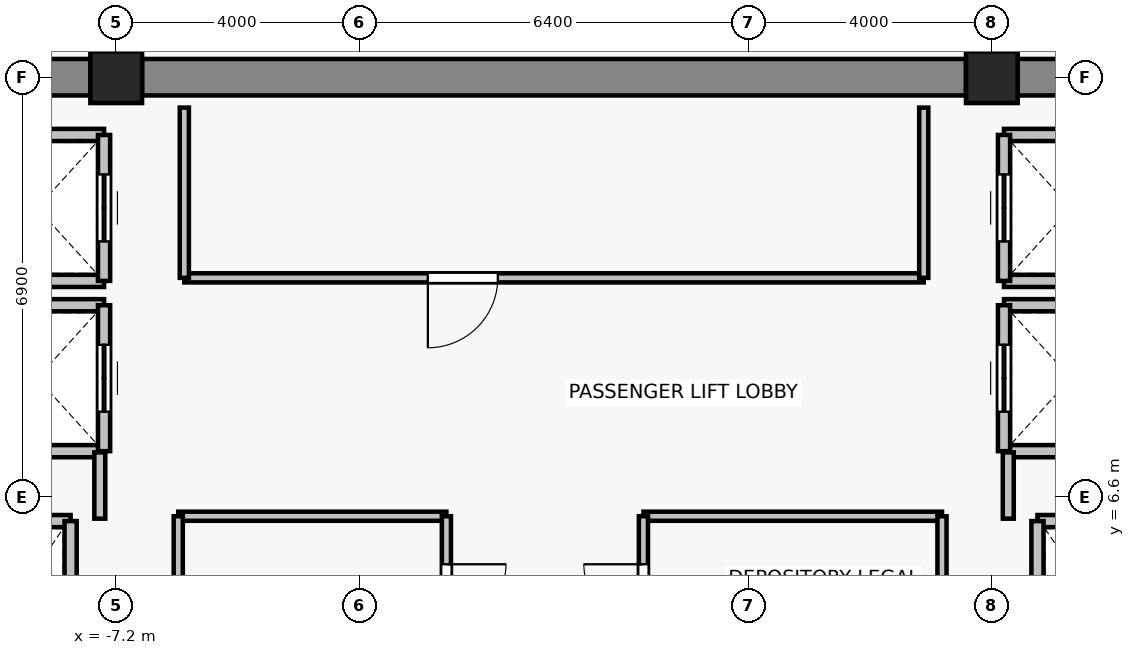
"""IFC4 building model, lengths in metres.
Left out: names, types, materials, properties, quantities, classifications, styles, units other than length and angle.
Written with IfcOpenShell. Run it as: python <this file> out.ifc"""

import sys

from ifc_helpers import new_model, si_unit, direction, frame, frame_2d, origin, origin_2d, place, context, subcontext, project, spatial, rectangle, extrude, source, transform, mapped, element, fill, save


model = new_model("IFC4")
c1 = context("Model", 3, precision=1e-05, world=origin(), true_north=direction((0.0, 1.0)))
c2 = subcontext(c1, "Body", "Model", "MODEL_VIEW")
j1 = project(units=[si_unit("LENGTHUNIT", "METRE"), si_unit("PLANEANGLEUNIT", "RADIAN")], contexts=[c1])
p1 = place(None, origin())
s1 = spatial("IfcSite", under=j1, at=p1, CompositionType="ELEMENT")
p2 = place(p1, origin())
s2 = spatial("IfcBuilding", under=s1, at=p2, CompositionType="ELEMENT")
p3 = place(p2, frame((0.0, 0.0, 255.1)))
s3 = spatial("IfcBuildingStorey", under=s2, at=p3, CompositionType="ELEMENT", Elevation=255.1)
for number, where, z_axis, x_axis in (
    (1, (-7.2, 13.5, 0.0), (0.0, 0.0, 1.0), (1.0, 0.0, 0.0)),
    (2, (7.2, 13.5, 0.0), (0.0, 0.0, 1.0), (1.0, 0.0, 0.0)),
):
    element("IfcColumn", number, at=place(p3, frame(where, z_axis=z_axis, x_axis=x_axis)), inside=s3, PredefinedType="COLUMN", context=c2, shape_type="SweptSolid", body=[
        extrude(rectangle(XDim=0.85, YDim=0.85, at=origin_2d()), origin(), (0.0, 0.0, 1.0), 3.3),
    ])
p4 = place(p3, frame((-13.975, 13.5, 0.0), z_axis=(0.0, 0.0, 1.0), x_axis=(1.0, 0.0, 0.0)))
e3 = element("IfcWall", 3, at=p4, inside=s3, PredefinedType="SHEAR", context=c2, shape_type="SweptSolid", body=[
    extrude(rectangle(XDim=6.35, YDim=0.6, at=frame_2d((3.175, 0.0))), origin(), (0.0, 0.0, 1.0), 3.075),
])
p5 = place(p3, frame((-6.775, 13.5, 0.0), z_axis=(0.0, 0.0, 1.0), x_axis=(1.0, 0.0, 0.0)))
e4 = element("IfcWall", 4, at=p5, inside=s3, PredefinedType="SHEAR", context=c2, shape_type="SweptSolid", body=[
    extrude(rectangle(XDim=13.55, YDim=0.6, at=frame_2d((6.775, 0.0))), origin(), (0.0, 0.0, 1.0), 3.075),
])
p6 = place(p3, frame((7.625, 13.5, 0.0), z_axis=(0.0, 0.0, 1.0), x_axis=(1.0, 0.0, 0.0)))
e5 = element("IfcWall", 5, at=p6, inside=s3, PredefinedType="SHEAR", context=c2, shape_type="SweptSolid", body=[
    extrude(rectangle(XDim=6.35, YDim=0.6, at=frame_2d((3.175, 0.0))), origin(), (0.0, 0.0, 1.0), 3.075),
])
p7 = place(p3, frame((-9.95, 6.2, 0.0), z_axis=(0.0, 0.0, 1.0), x_axis=(1.0, 0.0, 0.0)))
e6 = element("IfcWall", 6, at=p7, inside=s3, PredefinedType="SOLIDWALL", context=c2, shape_type="SweptSolid", body=[
    extrude(rectangle(XDim=2.0, YDim=0.2, at=frame_2d((1.0, 0.0))), origin(), (0.0, 0.0, 1.0), 3.075),
])
p8 = place(p3, frame((-7.95, 6.2, 0.0), z_axis=(0.0, 0.0, 1.0), x_axis=(0.0, -1.0, 0.0)))
e7 = element("IfcWall", 7, at=p8, inside=s3, PredefinedType="SOLIDWALL", context=c2, shape_type="SweptSolid", body=[
    extrude(rectangle(XDim=2.8, YDim=0.2, at=frame_2d((1.4, 0.0))), origin(), (0.0, 0.0, 1.0), 3.075),
])
p9 = place(p3, frame((7.95, 6.2, 0.0), z_axis=(0.0, 0.0, 1.0), x_axis=(1.0, 0.0, 0.0)))
e8 = element("IfcWall", 8, at=p9, inside=s3, PredefinedType="SOLIDWALL", context=c2, shape_type="SweptSolid", body=[
    extrude(rectangle(XDim=2.0, YDim=0.2, at=frame_2d((1.0, 0.0))), origin(), (0.0, 0.0, 1.0), 3.075),
])
p10 = place(p3, frame((7.95, 3.4, 0.0), z_axis=(0.0, 0.0, 1.0), x_axis=(0.0, 1.0, 0.0)))
e9 = element("IfcWall", 9, at=p10, inside=s3, PredefinedType="SOLIDWALL", context=c2, shape_type="SweptSolid", body=[
    extrude(rectangle(XDim=2.8, YDim=0.2, at=frame_2d((1.4, 0.0))), origin(), (0.0, 0.0, 1.0), 3.075),
])
for number, where, z_axis, x_axis in (
    (10, (-7.4, 7.35, 0.0), (0.0, 0.0, 1.0), (-1.0, 0.0, 0.0)),
    (11, (-9.6, 9.75, 0.0), (0.0, 0.0, 1.0), (1.0, 0.0, 0.0)),
):
    element("IfcWall", number, at=place(p3, frame(where, z_axis=z_axis, x_axis=x_axis)), inside=s3, PredefinedType="SOLIDWALL", context=c2, shape_type="SweptSolid", body=[
        extrude(rectangle(XDim=2.2, YDim=0.2, at=frame_2d((1.1, 0.0))), origin(), (0.0, 0.0, 1.0), 2.615),
    ])
p11 = place(p3, frame((-7.4, 9.75, 0.0), z_axis=(0.0, 0.0, 1.0), x_axis=(0.0, -1.0, 0.0)))
e12 = element("IfcWall", 12, at=p11, inside=s3, PredefinedType="SOLIDWALL", context=c2, shape_type="SweptSolid", body=[
    extrude(rectangle(XDim=2.4, YDim=0.2, at=frame_2d((1.2, 0.0))), origin(), (0.0, 0.0, 1.0), 2.615),
])
p12 = place(p11, frame((0.65, 0.0, 0.0)))
e13 = element("IfcOpeningElement", 13, at=p12, cuts=e12, PredefinedType="OPENING", context=c2, shape_type="SweptSolid", body=[
    extrude(rectangle(XDim=1.1, YDim=2.2, at=frame_2d((0.55, 1.1))), frame((0.0, 0.11, 0.0), z_axis=(0.0, -1.0, 0.0), x_axis=(1.0, 0.0, 0.0)), (0.0, 0.0, 1.0), 0.22),
])
for number, where, z_axis, x_axis in (
    (14, (-7.4, 10.15, 0.0), (0.0, 0.0, 1.0), (-1.0, 0.0, 0.0)),
    (15, (-9.6, 12.55, 0.0), (0.0, 0.0, 1.0), (1.0, 0.0, 0.0)),
):
    element("IfcWall", number, at=place(p3, frame(where, z_axis=z_axis, x_axis=x_axis)), inside=s3, PredefinedType="SOLIDWALL", context=c2, shape_type="SweptSolid", body=[
        extrude(rectangle(XDim=2.2, YDim=0.2, at=frame_2d((1.1, 0.0))), origin(), (0.0, 0.0, 1.0), 2.615),
    ])
p13 = place(p3, frame((-7.4, 12.55, 0.0), z_axis=(0.0, 0.0, 1.0), x_axis=(0.0, -1.0, 0.0)))
e16 = element("IfcWall", 16, at=p13, inside=s3, PredefinedType="SOLIDWALL", context=c2, shape_type="SweptSolid", body=[
    extrude(rectangle(XDim=2.4, YDim=0.2, at=frame_2d((1.2, 0.0))), origin(), (0.0, 0.0, 1.0), 2.615),
])
p14 = place(p13, frame((0.65, 0.0, 0.0)))
e17 = element("IfcOpeningElement", 17, at=p14, cuts=e16, PredefinedType="OPENING", context=c2, shape_type="SweptSolid", body=[
    extrude(rectangle(XDim=1.1, YDim=2.2, at=frame_2d((0.55, 1.1))), frame((0.0, 0.11, 0.0), z_axis=(0.0, -1.0, 0.0), x_axis=(1.0, 0.0, 0.0)), (0.0, 0.0, 1.0), 0.22),
])
for number, where, z_axis, x_axis in (
    (18, (9.6, 7.35, 0.0), (0.0, 0.0, 1.0), (-1.0, 0.0, 0.0)),
    (19, (7.4, 9.75, 0.0), (0.0, 0.0, 1.0), (1.0, 0.0, 0.0)),
):
    element("IfcWall", number, at=place(p3, frame(where, z_axis=z_axis, x_axis=x_axis)), inside=s3, PredefinedType="SOLIDWALL", context=c2, shape_type="SweptSolid", body=[
        extrude(rectangle(XDim=2.2, YDim=0.2, at=frame_2d((1.1, 0.0))), origin(), (0.0, 0.0, 1.0), 2.615),
    ])
p15 = place(p3, frame((7.4, 7.35, 0.0), z_axis=(0.0, 0.0, 1.0), x_axis=(0.0, 1.0, 0.0)))
e20 = element("IfcWall", 20, at=p15, inside=s3, PredefinedType="SOLIDWALL", context=c2, shape_type="SweptSolid", body=[
    extrude(rectangle(XDim=2.4, YDim=0.2, at=frame_2d((1.2, 0.0))), origin(), (0.0, 0.0, 1.0), 2.615),
])
p16 = place(p15, frame((0.65, 0.0, 0.0)))
e21 = element("IfcOpeningElement", 21, at=p16, cuts=e20, PredefinedType="OPENING", context=c2, shape_type="SweptSolid", body=[
    extrude(rectangle(XDim=1.1, YDim=2.2, at=frame_2d((0.55, 1.1))), frame((0.0, 0.11, 0.0), z_axis=(0.0, -1.0, 0.0), x_axis=(1.0, 0.0, 0.0)), (0.0, 0.0, 1.0), 0.22),
])
for number, where, z_axis, x_axis in (
    (22, (9.6, 10.15, 0.0), (0.0, 0.0, 1.0), (-1.0, 0.0, 0.0)),
    (23, (7.4, 12.55, 0.0), (0.0, 0.0, 1.0), (1.0, 0.0, 0.0)),
):
    element("IfcWall", number, at=place(p3, frame(where, z_axis=z_axis, x_axis=x_axis)), inside=s3, PredefinedType="SOLIDWALL", context=c2, shape_type="SweptSolid", body=[
        extrude(rectangle(XDim=2.2, YDim=0.2, at=frame_2d((1.1, 0.0))), origin(), (0.0, 0.0, 1.0), 2.615),
    ])
p17 = place(p3, frame((7.4, 10.15, 0.0), z_axis=(0.0, 0.0, 1.0), x_axis=(0.0, 1.0, 0.0)))
e24 = element("IfcWall", 24, at=p17, inside=s3, PredefinedType="SOLIDWALL", context=c2, shape_type="SweptSolid", body=[
    extrude(rectangle(XDim=2.4, YDim=0.2, at=frame_2d((1.2, 0.0))), origin(), (0.0, 0.0, 1.0), 2.615),
])
p18 = place(p17, frame((0.65, 0.0, 0.0)))
e25 = element("IfcOpeningElement", 25, at=p18, cuts=e24, PredefinedType="OPENING", context=c2, shape_type="SweptSolid", body=[
    extrude(rectangle(XDim=1.1, YDim=2.2, at=frame_2d((0.55, 1.1))), frame((0.0, 0.11, 0.0), z_axis=(0.0, -1.0, 0.0), x_axis=(1.0, 0.0, 0.0)), (0.0, 0.0, 1.0), 0.22),
])
for number, where, z_axis, x_axis in (
    (26, (-7.47, 7.33, 0.0), (0.0, 0.0, 1.0), (0.0, -1.0, 0.0)),
    (27, (7.47, 6.24, 0.0), (0.0, 0.0, 1.0), (0.0, 1.0, 0.0)),
):
    element("IfcWall", number, at=place(p3, frame(where, z_axis=z_axis, x_axis=x_axis)), inside=s3, PredefinedType="PARTITIONING", context=c2, shape_type="SweptSolid", body=[
        extrude(rectangle(XDim=1.09, YDim=0.18, at=frame_2d((0.545, 0.0))), origin(), (0.0, 0.0, 1.0), 2.615),
    ])
p19 = place(p3, frame((6.08, 10.2, 0.0), z_axis=(0.0, 0.0, 1.0), x_axis=(-1.0, 0.0, 0.0)))
e28 = element("IfcWall", 28, at=p19, inside=s3, PredefinedType="PARTITIONING", context=c2, shape_type="SweptSolid", body=[
    extrude(rectangle(XDim=12.16, YDim=0.15, at=frame_2d((6.08, 0.0))), origin(), (0.0, 0.0, 1.0), 3.075),
])
p20 = place(p19, frame((7.005, 0.0, 0.0)))
e29 = element("IfcOpeningElement", 29, at=p20, cuts=e28, PredefinedType="OPENING", context=c2, shape_type="SweptSolid", body=[
    extrude(rectangle(XDim=1.15, YDim=2.15, at=frame_2d((0.575, 1.075))), frame((0.0, 0.085, 0.0), z_axis=(0.0, -1.0, 0.0), x_axis=(1.0, 0.0, 0.0)), (0.0, 0.0, 1.0), 0.17),
])
for number, where, z_axis, x_axis in (
    (30, (-6.08, 10.2, 0.0), (0.0, 0.0, 1.0), (0.0, 1.0, 0.0)),
    (31, (6.08, 13.0, 0.0), (0.0, 0.0, 1.0), (0.0, -1.0, 0.0)),
):
    element("IfcWall", number, at=place(p3, frame(where, z_axis=z_axis, x_axis=x_axis)), inside=s3, PredefinedType="PARTITIONING", context=c2, shape_type="SweptSolid", body=[
        extrude(rectangle(XDim=2.8, YDim=0.15, at=frame_2d((1.4, 0.0))), origin(), (0.0, 0.0, 1.0), 3.075),
    ])
p21 = place(p3, frame((-6.18, 6.28, 0.0), z_axis=(0.0, 0.0, 1.0), x_axis=(1.0, 0.0, 0.0)))
e32 = element("IfcWall", 32, at=p21, inside=s3, PredefinedType="PARTITIONING", context=c2, shape_type="SweptSolid", body=[
    extrude(rectangle(XDim=4.41, YDim=0.15, at=frame_2d((2.205, 0.0))), origin(), (0.0, 0.0, 1.0), 3.075),
])
p22 = place(p3, frame((-6.18, 3.76, 0.0), z_axis=(0.0, 0.0, 1.0), x_axis=(0.0, 1.0, 0.0)))
e33 = element("IfcWall", 33, at=p22, inside=s3, PredefinedType="PARTITIONING", context=c2, shape_type="SweptSolid", body=[
    extrude(rectangle(XDim=2.52, YDim=0.15, at=frame_2d((1.26, 0.0))), origin(), (0.0, 0.0, 1.0), 3.075),
])
p23 = place(p3, frame((-1.77, 6.28, 0.0), z_axis=(0.0, 0.0, 1.0), x_axis=(0.0, -1.0, 0.0)))
e34 = element("IfcWall", 34, at=p23, inside=s3, PredefinedType="PARTITIONING", context=c2, shape_type="SweptSolid", body=[
    extrude(rectangle(XDim=2.52, YDim=0.15, at=frame_2d((1.26, 0.0))), origin(), (0.0, 0.0, 1.0), 3.075),
])
p24 = place(p23, frame((0.79, 0.0, 0.0)))
e35 = element("IfcOpeningElement", 35, at=p24, cuts=e34, PredefinedType="OPENING", context=c2, shape_type="SweptSolid", body=[
    extrude(rectangle(XDim=0.98, YDim=2.15, at=frame_2d((0.49, 1.075))), frame((0.0, 0.085, 0.0), z_axis=(0.0, -1.0, 0.0), x_axis=(1.0, 0.0, 0.0)), (0.0, 0.0, 1.0), 0.17),
])
p25 = place(p3, frame((1.47, 6.28, 0.0), z_axis=(0.0, 0.0, 1.0), x_axis=(1.0, 0.0, 0.0)))
e36 = element("IfcWall", 36, at=p25, inside=s3, PredefinedType="PARTITIONING", context=c2, shape_type="SweptSolid", body=[
    extrude(rectangle(XDim=4.91, YDim=0.15, at=frame_2d((2.455, 0.0))), origin(), (0.0, 0.0, 1.0), 3.075),
])
p26 = place(p3, frame((1.47, 3.76, 0.0), z_axis=(0.0, 0.0, 1.0), x_axis=(0.0, 1.0, 0.0)))
e37 = element("IfcWall", 37, at=p26, inside=s3, PredefinedType="PARTITIONING", context=c2, shape_type="SweptSolid", body=[
    extrude(rectangle(XDim=2.52, YDim=0.15, at=frame_2d((1.26, 0.0))), origin(), (0.0, 0.0, 1.0), 3.075),
])
p27 = place(p26, frame((0.75, 0.0, 0.0)))
e38 = element("IfcOpeningElement", 38, at=p27, cuts=e37, PredefinedType="OPENING", context=c2, shape_type="SweptSolid", body=[
    extrude(rectangle(XDim=0.98, YDim=2.15, at=frame_2d((0.49, 1.075))), frame((0.0, 0.085, 0.0), z_axis=(0.0, -1.0, 0.0), x_axis=(1.0, 0.0, 0.0)), (0.0, 0.0, 1.0), 0.17),
])
p28 = place(p3, frame((6.38, 6.28, 0.0), z_axis=(0.0, 0.0, 1.0), x_axis=(0.0, -1.0, 0.0)))
e39 = element("IfcWall", 39, at=p28, inside=s3, PredefinedType="PARTITIONING", context=c2, shape_type="SweptSolid", body=[
    extrude(rectangle(XDim=2.52, YDim=0.15, at=frame_2d((1.26, 0.0))), origin(), (0.0, 0.0, 1.0), 3.075),
])
m1 = source(origin(), c2, "Body", "SweptSolid", [
    extrude(rectangle(XDim=1.1, YDim=2.2, at=frame_2d((0.55, 1.1))), frame((0.0, 0.025, 0.0), z_axis=(0.0, -1.0, 0.0), x_axis=(1.0, 0.0, 0.0)), (0.0, 0.0, 1.0), 0.05),
])
p29 = place(p12, origin())
e40 = element("IfcDoor", 40, at=p29, inside=s3, OperationType="DOUBLE_DOOR_SLIDING", PredefinedType="DOOR", context=c2, shape_type="MappedRepresentation", body=[
    mapped(m1, transform((0.0, 0.0, 0.0), x_axis=(1.0, 0.0, 0.0), y_axis=(0.0, 1.0, 0.0), z_axis=(0.0, 0.0, 1.0), scale=1.0)),
])
fill(e13, e40)
p30 = place(p14, origin())
e41 = element("IfcDoor", 41, at=p30, inside=s3, OperationType="DOUBLE_DOOR_SLIDING", PredefinedType="DOOR", context=c2, shape_type="MappedRepresentation", body=[
    mapped(m1, transform((0.0, 0.0, 0.0), x_axis=(1.0, 0.0, 0.0), y_axis=(0.0, 1.0, 0.0), z_axis=(0.0, 0.0, 1.0), scale=1.0)),
])
fill(e17, e41)
p31 = place(p16, origin())
e42 = element("IfcDoor", 42, at=p31, inside=s3, OperationType="DOUBLE_DOOR_SLIDING", PredefinedType="DOOR", context=c2, shape_type="MappedRepresentation", body=[
    mapped(m1, transform((0.0, 0.0, 0.0), x_axis=(1.0, 0.0, 0.0), y_axis=(0.0, 1.0, 0.0), z_axis=(0.0, 0.0, 1.0), scale=1.0)),
])
fill(e21, e42)
p32 = place(p18, origin())
e43 = element("IfcDoor", 43, at=p32, inside=s3, OperationType="DOUBLE_DOOR_SLIDING", PredefinedType="DOOR", context=c2, shape_type="MappedRepresentation", body=[
    mapped(m1, transform((0.0, 0.0, 0.0), x_axis=(1.0, 0.0, 0.0), y_axis=(0.0, 1.0, 0.0), z_axis=(0.0, 0.0, 1.0), scale=1.0)),
])
fill(e25, e43)
m2 = source(origin(), c2, "Body", "SweptSolid", [
    extrude(rectangle(XDim=1.15, YDim=2.15, at=frame_2d((0.575, 1.075))), frame((0.0, 0.025, 0.0), z_axis=(0.0, -1.0, 0.0), x_axis=(1.0, 0.0, 0.0)), (0.0, 0.0, 1.0), 0.05),
])
p33 = place(p20, origin())
e44 = element("IfcDoor", 44, at=p33, inside=s3, OperationType="SINGLE_SWING_RIGHT", PredefinedType="DOOR", context=c2, shape_type="MappedRepresentation", body=[
    mapped(m2, transform((0.0, 0.0, 0.0), x_axis=(1.0, 0.0, 0.0), y_axis=(0.0, 1.0, 0.0), z_axis=(0.0, 0.0, 1.0), scale=1.0)),
])
fill(e29, e44)
m3 = source(origin(), c2, "Body", "SweptSolid", [
    extrude(rectangle(XDim=0.98, YDim=2.15, at=frame_2d((0.49, 1.075))), frame((0.0, 0.025, 0.0), z_axis=(0.0, -1.0, 0.0), x_axis=(1.0, 0.0, 0.0)), (0.0, 0.0, 1.0), 0.05),
])
p34 = place(p24, origin())
e45 = element("IfcDoor", 45, at=p34, inside=s3, OperationType="SINGLE_SWING_LEFT", PredefinedType="DOOR", context=c2, shape_type="MappedRepresentation", body=[
    mapped(m3, transform((0.0, 0.0, 0.0), x_axis=(1.0, 0.0, 0.0), y_axis=(0.0, 1.0, 0.0), z_axis=(0.0, 0.0, 1.0), scale=1.0)),
])
fill(e35, e45)
p35 = place(p27, origin())
e46 = element("IfcDoor", 46, at=p35, inside=s3, OperationType="SINGLE_SWING_RIGHT", PredefinedType="DOOR", context=c2, shape_type="MappedRepresentation", body=[
    mapped(m3, transform((0.0, 0.0, 0.0), x_axis=(1.0, 0.0, 0.0), y_axis=(0.0, 1.0, 0.0), z_axis=(0.0, 0.0, 1.0), scale=1.0)),
])
fill(e38, e46)
save(model, sys.argv[1])
